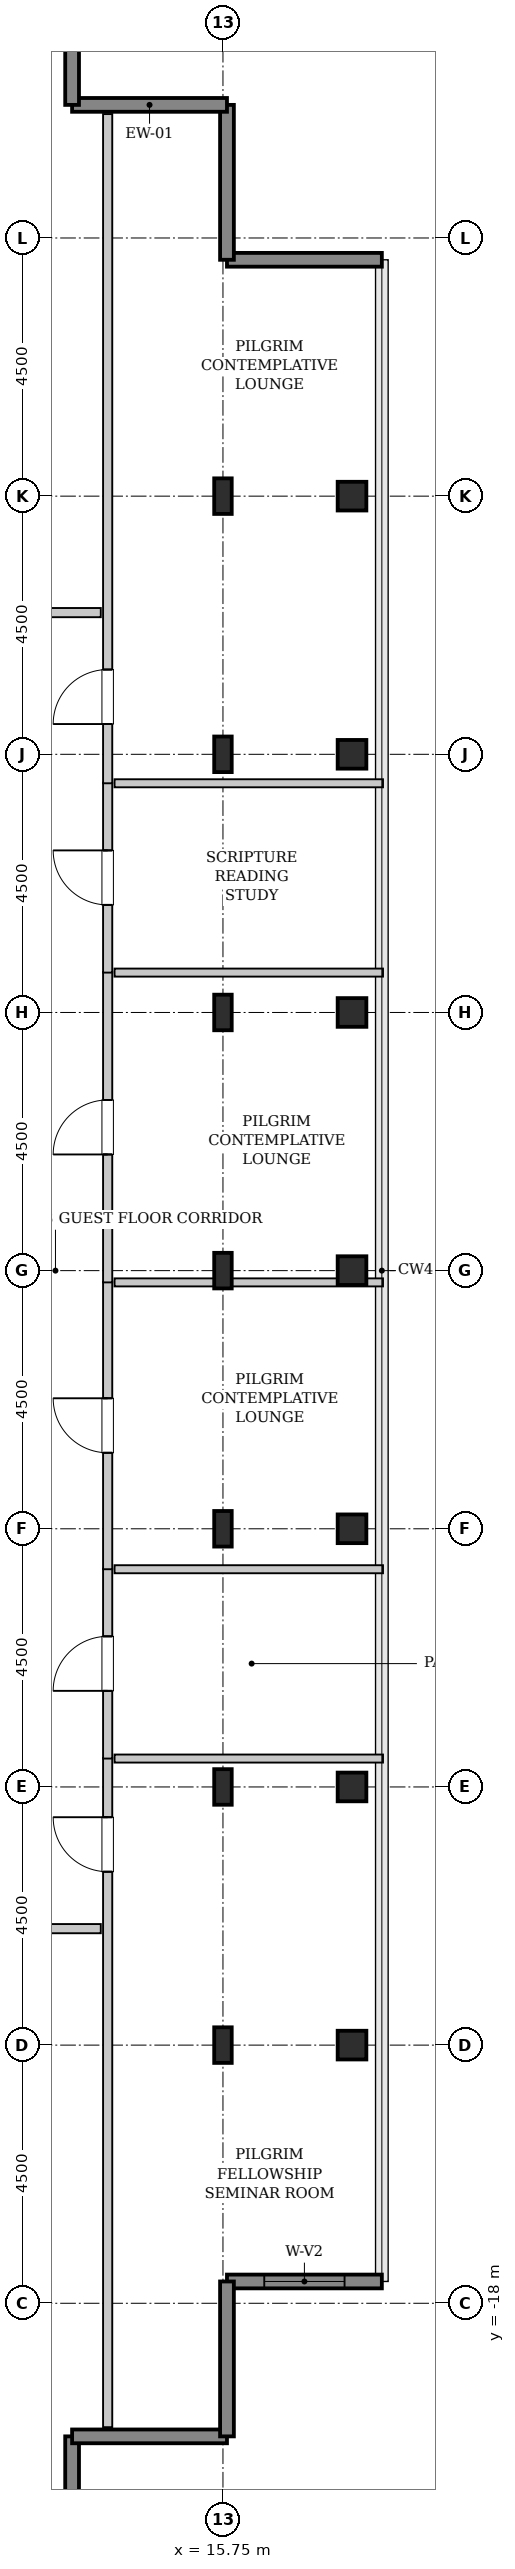
"""IFC4 building model, lengths in metres.
Left out: names, types, materials, properties, quantities, classifications, styles, units other than length and angle.
Written with IfcOpenShell. Run it as: python <this file> out.ifc"""

import sys

from ifc_helpers import new_model, si_unit, direction, frame, frame_2d, origin, origin_2d, place, context, subcontext, project, spatial, rectangle, hollow_rectangle, i_section, extrude, source, transform, mapped, element, fill, save


model = new_model("IFC4")
c1 = context("Model", 3, precision=1e-05, world=origin(), true_north=direction((0.0, 1.0)))
c2 = subcontext(c1, "Body", "Model", "MODEL_VIEW")
j1 = project(units=[si_unit("LENGTHUNIT", "METRE"), si_unit("PLANEANGLEUNIT", "RADIAN")], contexts=[c1])
p1 = place(None, origin())
s1 = spatial("IfcSite", under=j1, at=p1, CompositionType="ELEMENT")
p2 = place(p1, origin())
s2 = spatial("IfcBuilding", under=s1, at=p2, CompositionType="ELEMENT")
p3 = place(p2, frame((0.0, 0.0, 291.2)))
s3 = spatial("IfcBuildingStorey", under=s2, at=p3, CompositionType="ELEMENT", Elevation=291.2)
m1 = source(origin(), c2, "Body", "SweptSolid", [
    extrude(i_section(OverallWidth=0.305, OverallDepth=0.62, WebThickness=0.021, FlangeThickness=0.04, FilletRadius=0.027, at=origin_2d()), origin(), (0.0, 0.0, 1.0), 3.8),
])
for number, where, z_axis, x_axis in (
    (1, (15.75, -13.5, 0.0), (0.0, 0.0, 1.0), (1.0, 0.0, 0.0)),
    (2, (15.75, -9.0, 0.0), (0.0, 0.0, 1.0), (1.0, 0.0, 0.0)),
    (3, (15.75, -4.5, 0.0), (0.0, 0.0, 1.0), (1.0, 0.0, 0.0)),
    (4, (15.75, 0.0, 0.0), (0.0, 0.0, 1.0), (1.0, 0.0, 0.0)),
    (5, (15.75, 4.5, 0.0), (0.0, 0.0, 1.0), (1.0, 0.0, 0.0)),
    (6, (15.75, 9.0, 0.0), (0.0, 0.0, 1.0), (1.0, 0.0, 0.0)),
    (7, (15.75, 13.5, 0.0), (0.0, 0.0, 1.0), (1.0, 0.0, 0.0)),
):
    element("IfcColumn", number, at=place(p3, frame(where, z_axis=z_axis, x_axis=x_axis)), inside=s3, PredefinedType="COLUMN", context=c2, shape_type="MappedRepresentation", body=[
        mapped(m1, transform((0.0, 0.0, 0.0), x_axis=(1.0, 0.0, 0.0), y_axis=(0.0, 1.0, 0.0), z_axis=(0.0, 0.0, 1.0), scale=1.0)),
    ])
m2 = source(origin(), c2, "Body", "SweptSolid", [
    extrude(hollow_rectangle(XDim=0.5, YDim=0.5, WallThickness=0.025, InnerFilletRadius=0.025, OuterFilletRadius=0.05, at=origin_2d()), origin(), (0.0, 0.0, 1.0), 3.8),
])
for number, where, z_axis, x_axis in (
    (8, (18.0, -13.5, 0.0), (0.0, 0.0, 1.0), (1.0, 0.0, 0.0)),
    (9, (18.0, -9.0, 0.0), (0.0, 0.0, 1.0), (1.0, 0.0, 0.0)),
    (10, (18.0, -4.5, 0.0), (0.0, 0.0, 1.0), (1.0, 0.0, 0.0)),
    (11, (18.0, 0.0, 0.0), (0.0, 0.0, 1.0), (1.0, 0.0, 0.0)),
    (12, (18.0, 4.5, 0.0), (0.0, 0.0, 1.0), (1.0, 0.0, 0.0)),
    (13, (18.0, 9.0, 0.0), (0.0, 0.0, 1.0), (1.0, 0.0, 0.0)),
    (14, (18.0, 13.5, 0.0), (0.0, 0.0, 1.0), (1.0, 0.0, 0.0)),
):
    element("IfcColumn", number, at=place(p3, frame(where, z_axis=z_axis, x_axis=x_axis)), inside=s3, PredefinedType="COLUMN", context=c2, shape_type="MappedRepresentation", body=[
        mapped(m2, transform((0.0, 0.0, 0.0), x_axis=(1.0, 0.0, 0.0), y_axis=(0.0, 1.0, 0.0), z_axis=(0.0, 0.0, 1.0), scale=1.0)),
    ])
m3 = source(origin(), c2, "Body", "SweptSolid", [
    extrude(rectangle(XDim=2.7, YDim=0.24, at=frame_2d((1.35, 0.0))), origin(), (0.0, 0.0, 1.0), 3.55),
])
p4 = place(p3, frame((15.82, -17.62, 0.0), z_axis=(0.0, 0.0, 1.0), x_axis=(1.0, 0.0, 0.0)))
e15 = element("IfcWall", 15, at=p4, inside=s3, PredefinedType="SHEAR", context=c2, shape_type="MappedRepresentation", body=[
    mapped(m3, transform((0.0, 0.0, 0.0), x_axis=(1.0, 0.0, 0.0), y_axis=(0.0, 1.0, 0.0), z_axis=(0.0, 0.0, 1.0), scale=1.0)),
])
p5 = place(p4, frame((0.65, 0.0, 0.85)))
e16 = element("IfcOpeningElement", 16, at=p5, cuts=e15, PredefinedType="OPENING", context=c2, shape_type="SweptSolid", body=[
    extrude(rectangle(XDim=1.4, YDim=1.8, at=frame_2d((0.7, 0.9))), frame((0.0, 0.13, 0.0), z_axis=(0.0, -1.0, 0.0), x_axis=(1.0, 0.0, 0.0)), (0.0, 0.0, 1.0), 0.26),
])
for number, where, z_axis, x_axis in (
    (17, (18.52, 17.62, 0.0), (0.0, 0.0, 1.0), (-1.0, 0.0, 0.0)),
    (18, (15.82, 17.62, 0.0), (0.0, 0.0, 1.0), (0.0, 1.0, 0.0)),
    (19, (15.82, 20.32, 0.0), (0.0, 0.0, 1.0), (-1.0, 0.0, 0.0)),
    (20, (13.12, 20.32, 0.0), (0.0, 0.0, 1.0), (0.0, 1.0, 0.0)),
    (21, (13.12, -23.02, 0.0), (0.0, 0.0, 1.0), (0.0, 1.0, 0.0)),
    (22, (13.12, -20.32, 0.0), (0.0, 0.0, 1.0), (1.0, 0.0, 0.0)),
    (23, (15.82, -20.32, 0.0), (0.0, 0.0, 1.0), (0.0, 1.0, 0.0)),
):
    element("IfcWall", number, at=place(p3, frame(where, z_axis=z_axis, x_axis=x_axis)), inside=s3, PredefinedType="SHEAR", context=c2, shape_type="MappedRepresentation", body=[
        mapped(m3, transform((0.0, 0.0, 0.0), x_axis=(1.0, 0.0, 0.0), y_axis=(0.0, 1.0, 0.0), z_axis=(0.0, 0.0, 1.0), scale=1.0)),
    ])
m4 = source(origin(), c2, "Body", "SweptSolid", [
    extrude(rectangle(XDim=11.665, YDim=0.16, at=frame_2d((5.833, 0.0))), origin(), (0.0, 0.0, 1.0), 3.535),
])
p6 = place(p3, frame((13.74, -20.16, 0.0), z_axis=(0.0, 0.0, 1.0), x_axis=(0.0, 1.0, 0.0)))
e24 = element("IfcWall", 24, at=p6, inside=s3, PredefinedType="PARTITIONING", context=c2, shape_type="MappedRepresentation", body=[
    mapped(m4, transform((0.0, 0.0, 0.0), x_axis=(1.0, 0.0, 0.0), y_axis=(0.0, 1.0, 0.0), z_axis=(0.0, 0.0, 1.0), scale=1.0)),
])
p7 = place(p6, frame((9.683, 0.0, 0.0)))
e25 = element("IfcOpeningElement", 25, at=p7, cuts=e24, PredefinedType="OPENING", context=c2, shape_type="SweptSolid", body=[
    extrude(rectangle(XDim=0.95, YDim=2.1, at=frame_2d((0.475, 1.05))), frame((0.0, 0.09, 0.0), z_axis=(0.0, -1.0, 0.0), x_axis=(1.0, 0.0, 0.0)), (0.0, 0.0, 1.0), 0.18),
])
m5 = source(origin(), c2, "Body", "SweptSolid", [
    extrude(rectangle(XDim=4.68, YDim=0.14, at=frame_2d((2.34, 0.0))), origin(), (0.0, 0.0, 1.0), 2.925),
])
p8 = place(p3, frame((13.86, -8.505, 0.0), z_axis=(0.0, 0.0, 1.0), x_axis=(1.0, 0.0, 0.0)))
e26 = element("IfcWall", 26, at=p8, inside=s3, PredefinedType="PARTITIONING", context=c2, shape_type="MappedRepresentation", body=[
    mapped(m5, transform((0.0, 0.0, 0.0), x_axis=(1.0, 0.0, 0.0), y_axis=(0.0, 1.0, 0.0), z_axis=(0.0, 0.0, 1.0), scale=1.0)),
])
m6 = source(origin(), c2, "Body", "SweptSolid", [
    extrude(rectangle(XDim=3.31, YDim=0.16, at=frame_2d((1.655, 0.0))), origin(), (0.0, 0.0, 1.0), 3.535),
])
p9 = place(p3, frame((13.74, -8.505, 0.0), z_axis=(0.0, 0.0, 1.0), x_axis=(0.0, 1.0, 0.0)))
e27 = element("IfcWall", 27, at=p9, inside=s3, PredefinedType="PARTITIONING", context=c2, shape_type="MappedRepresentation", body=[
    mapped(m6, transform((0.0, 0.0, 0.0), x_axis=(1.0, 0.0, 0.0), y_axis=(0.0, 1.0, 0.0), z_axis=(0.0, 0.0, 1.0), scale=1.0)),
])
p10 = place(p9, frame((1.18, 0.0, 0.0)))
e28 = element("IfcOpeningElement", 28, at=p10, cuts=e27, PredefinedType="OPENING", context=c2, shape_type="SweptSolid", body=[
    extrude(rectangle(XDim=0.95, YDim=2.1, at=frame_2d((0.475, 1.05))), frame((0.0, 0.09, 0.0), z_axis=(0.0, -1.0, 0.0), x_axis=(1.0, 0.0, 0.0)), (0.0, 0.0, 1.0), 0.18),
])
m7 = source(origin(), c2, "Body", "SweptSolid", [
    extrude(rectangle(XDim=4.68, YDim=0.14, at=frame_2d((2.34, 0.0))), origin(), (0.0, 0.0, 1.0), 3.535),
])
p11 = place(p3, frame((13.86, -5.205, 0.0), z_axis=(0.0, 0.0, 1.0), x_axis=(1.0, 0.0, 0.0)))
e29 = element("IfcWall", 29, at=p11, inside=s3, PredefinedType="PARTITIONING", context=c2, shape_type="MappedRepresentation", body=[
    mapped(m7, transform((0.0, 0.0, 0.0), x_axis=(1.0, 0.0, 0.0), y_axis=(0.0, 1.0, 0.0), z_axis=(0.0, 0.0, 1.0), scale=1.0)),
])
m8 = source(origin(), c2, "Body", "SweptSolid", [
    extrude(rectangle(XDim=5.01, YDim=0.16, at=frame_2d((2.505, 0.0))), origin(), (0.0, 0.0, 1.0), 3.535),
])
p12 = place(p3, frame((13.74, -5.205, 0.0), z_axis=(0.0, 0.0, 1.0), x_axis=(0.0, 1.0, 0.0)))
e30 = element("IfcWall", 30, at=p12, inside=s3, PredefinedType="PARTITIONING", context=c2, shape_type="MappedRepresentation", body=[
    mapped(m8, transform((0.0, 0.0, 0.0), x_axis=(1.0, 0.0, 0.0), y_axis=(0.0, 1.0, 0.0), z_axis=(0.0, 0.0, 1.0), scale=1.0)),
])
p13 = place(p12, frame((2.03, 0.0, 0.0)))
e31 = element("IfcOpeningElement", 31, at=p13, cuts=e30, PredefinedType="OPENING", context=c2, shape_type="SweptSolid", body=[
    extrude(rectangle(XDim=0.95, YDim=2.1, at=frame_2d((0.475, 1.05))), frame((0.0, 0.09, 0.0), z_axis=(0.0, -1.0, 0.0), x_axis=(1.0, 0.0, 0.0)), (0.0, 0.0, 1.0), 0.18),
])
p14 = place(p3, frame((13.86, -0.205, 0.0), z_axis=(0.0, 0.0, 1.0), x_axis=(1.0, 0.0, 0.0)))
e32 = element("IfcWall", 32, at=p14, inside=s3, PredefinedType="PARTITIONING", context=c2, shape_type="MappedRepresentation", body=[
    mapped(m5, transform((0.0, 0.0, 0.0), x_axis=(1.0, 0.0, 0.0), y_axis=(0.0, 1.0, 0.0), z_axis=(0.0, 0.0, 1.0), scale=1.0)),
])
m9 = source(origin(), c2, "Body", "SweptSolid", [
    extrude(rectangle(XDim=5.41, YDim=0.16, at=frame_2d((2.705, 0.0))), origin(), (0.0, 0.0, 1.0), 3.535),
])
p15 = place(p3, frame((13.74, -0.205, 0.0), z_axis=(0.0, 0.0, 1.0), x_axis=(0.0, 1.0, 0.0)))
e33 = element("IfcWall", 33, at=p15, inside=s3, PredefinedType="PARTITIONING", context=c2, shape_type="MappedRepresentation", body=[
    mapped(m9, transform((0.0, 0.0, 0.0), x_axis=(1.0, 0.0, 0.0), y_axis=(0.0, 1.0, 0.0), z_axis=(0.0, 0.0, 1.0), scale=1.0)),
])
p16 = place(p15, frame((2.23, 0.0, 0.0)))
e34 = element("IfcOpeningElement", 34, at=p16, cuts=e33, PredefinedType="OPENING", context=c2, shape_type="SweptSolid", body=[
    extrude(rectangle(XDim=0.95, YDim=2.1, at=frame_2d((0.475, 1.05))), frame((0.0, 0.09, 0.0), z_axis=(0.0, -1.0, 0.0), x_axis=(1.0, 0.0, 0.0)), (0.0, 0.0, 1.0), 0.18),
])
p17 = place(p3, frame((13.86, 5.195, 0.0), z_axis=(0.0, 0.0, 1.0), x_axis=(1.0, 0.0, 0.0)))
e35 = element("IfcWall", 35, at=p17, inside=s3, PredefinedType="PARTITIONING", context=c2, shape_type="MappedRepresentation", body=[
    mapped(m7, transform((0.0, 0.0, 0.0), x_axis=(1.0, 0.0, 0.0), y_axis=(0.0, 1.0, 0.0), z_axis=(0.0, 0.0, 1.0), scale=1.0)),
])
p18 = place(p3, frame((13.74, 5.195, 0.0), z_axis=(0.0, 0.0, 1.0), x_axis=(0.0, 1.0, 0.0)))
e36 = element("IfcWall", 36, at=p18, inside=s3, PredefinedType="PARTITIONING", context=c2, shape_type="MappedRepresentation", body=[
    mapped(m6, transform((0.0, 0.0, 0.0), x_axis=(1.0, 0.0, 0.0), y_axis=(0.0, 1.0, 0.0), z_axis=(0.0, 0.0, 1.0), scale=1.0)),
])
p19 = place(p18, frame((1.18, 0.0, 0.0)))
e37 = element("IfcOpeningElement", 37, at=p19, cuts=e36, PredefinedType="OPENING", context=c2, shape_type="SweptSolid", body=[
    extrude(rectangle(XDim=0.95, YDim=2.1, at=frame_2d((0.475, 1.05))), frame((0.0, 0.09, 0.0), z_axis=(0.0, -1.0, 0.0), x_axis=(1.0, 0.0, 0.0)), (0.0, 0.0, 1.0), 0.18),
])
p20 = place(p3, frame((13.86, 8.495, 0.0), z_axis=(0.0, 0.0, 1.0), x_axis=(1.0, 0.0, 0.0)))
e38 = element("IfcWall", 38, at=p20, inside=s3, PredefinedType="PARTITIONING", context=c2, shape_type="MappedRepresentation", body=[
    mapped(m5, transform((0.0, 0.0, 0.0), x_axis=(1.0, 0.0, 0.0), y_axis=(0.0, 1.0, 0.0), z_axis=(0.0, 0.0, 1.0), scale=1.0)),
])
p21 = place(p3, frame((13.74, 8.495, 0.0), z_axis=(0.0, 0.0, 1.0), x_axis=(0.0, 1.0, 0.0)))
e39 = element("IfcWall", 39, at=p21, inside=s3, PredefinedType="PARTITIONING", context=c2, shape_type="MappedRepresentation", body=[
    mapped(m4, transform((0.0, 0.0, 0.0), x_axis=(1.0, 0.0, 0.0), y_axis=(0.0, 1.0, 0.0), z_axis=(0.0, 0.0, 1.0), scale=1.0)),
])
p22 = place(p21, frame((1.032, 0.0, 0.0)))
e40 = element("IfcOpeningElement", 40, at=p22, cuts=e39, PredefinedType="OPENING", context=c2, shape_type="SweptSolid", body=[
    extrude(rectangle(XDim=0.95, YDim=2.1, at=frame_2d((0.475, 1.05))), frame((0.0, 0.09, 0.0), z_axis=(0.0, -1.0, 0.0), x_axis=(1.0, 0.0, 0.0)), (0.0, 0.0, 1.0), 0.18),
])
m10 = source(origin(), c2, "Body", "SweptSolid", [
    extrude(rectangle(XDim=5.825, YDim=0.16, at=frame_2d((2.913, 0.0))), origin(), (0.0, 0.0, 1.0), 3.535),
])
p23 = place(p3, frame((7.795, 11.47, 0.0), z_axis=(0.0, 0.0, 1.0), x_axis=(1.0, 0.0, 0.0)))
e41 = element("IfcWall", 41, at=p23, inside=s3, PredefinedType="PARTITIONING", context=c2, shape_type="MappedRepresentation", body=[
    mapped(m10, transform((0.0, 0.0, 0.0), x_axis=(1.0, 0.0, 0.0), y_axis=(0.0, 1.0, 0.0), z_axis=(0.0, 0.0, 1.0), scale=1.0)),
])
p24 = place(p23, frame((2.438, 0.0, 0.0)))
e42 = element("IfcOpeningElement", 42, at=p24, cuts=e41, PredefinedType="OPENING", context=c2, shape_type="SweptSolid", body=[
    extrude(rectangle(XDim=0.95, YDim=2.1, at=frame_2d((0.475, 1.05))), frame((0.0, 0.09, 0.0), z_axis=(0.0, -1.0, 0.0), x_axis=(1.0, 0.0, 0.0)), (0.0, 0.0, 1.0), 0.18),
])
p25 = place(p3, frame((7.795, -11.47, 0.0), z_axis=(0.0, 0.0, 1.0), x_axis=(1.0, 0.0, 0.0)))
e43 = element("IfcWall", 43, at=p25, inside=s3, PredefinedType="PARTITIONING", context=c2, shape_type="MappedRepresentation", body=[
    mapped(m10, transform((0.0, 0.0, 0.0), x_axis=(1.0, 0.0, 0.0), y_axis=(0.0, 1.0, 0.0), z_axis=(0.0, 0.0, 1.0), scale=1.0)),
])
p26 = place(p25, frame((2.438, 0.0, 0.0)))
e44 = element("IfcOpeningElement", 44, at=p26, cuts=e43, PredefinedType="OPENING", context=c2, shape_type="SweptSolid", body=[
    extrude(rectangle(XDim=0.95, YDim=2.1, at=frame_2d((0.475, 1.05))), frame((0.0, 0.09, 0.0), z_axis=(0.0, -1.0, 0.0), x_axis=(1.0, 0.0, 0.0)), (0.0, 0.0, 1.0), 0.18),
])
m11 = source(origin(), c2, "Body", "SweptSolid", [
    extrude(rectangle(XDim=1.4, YDim=1.8, at=frame_2d((0.7, 0.9))), frame((0.0, 0.03, 0.0), z_axis=(0.0, -1.0, 0.0), x_axis=(1.0, 0.0, 0.0)), (0.0, 0.0, 1.0), 0.06),
])
p27 = place(p5, origin())
e45 = element("IfcWindow", 45, at=p27, inside=s3, PartitioningType="SINGLE_PANEL", PredefinedType="WINDOW", context=c2, shape_type="MappedRepresentation", body=[
    mapped(m11, transform((0.0, 0.0, 0.0), x_axis=(1.0, 0.0, 0.0), y_axis=(0.0, 1.0, 0.0), z_axis=(0.0, 0.0, 1.0), scale=1.0)),
])
fill(e16, e45)
m12 = source(origin(), c2, "Body", "SweptSolid", [
    extrude(rectangle(XDim=0.95, YDim=2.1, at=frame_2d((0.475, 1.05))), frame((0.0, 0.025, 0.0), z_axis=(0.0, -1.0, 0.0), x_axis=(1.0, 0.0, 0.0)), (0.0, 0.0, 1.0), 0.05),
])
p28 = place(p7, origin())
e46 = element("IfcDoor", 46, at=p28, inside=s3, OperationType="SINGLE_SWING_RIGHT", PredefinedType="DOOR", context=c2, shape_type="MappedRepresentation", body=[
    mapped(m12, transform((0.0, 0.0, 0.0), x_axis=(1.0, 0.0, 0.0), y_axis=(0.0, 1.0, 0.0), z_axis=(0.0, 0.0, 1.0), scale=1.0)),
])
fill(e25, e46)
p29 = place(p10, origin())
e47 = element("IfcDoor", 47, at=p29, inside=s3, OperationType="SINGLE_SWING_LEFT", PredefinedType="DOOR", context=c2, shape_type="MappedRepresentation", body=[
    mapped(m12, transform((0.0, 0.0, 0.0), x_axis=(1.0, 0.0, 0.0), y_axis=(0.0, 1.0, 0.0), z_axis=(0.0, 0.0, 1.0), scale=1.0)),
])
fill(e28, e47)
p30 = place(p13, origin())
e48 = element("IfcDoor", 48, at=p30, inside=s3, OperationType="SINGLE_SWING_RIGHT", PredefinedType="DOOR", context=c2, shape_type="MappedRepresentation", body=[
    mapped(m12, transform((0.0, 0.0, 0.0), x_axis=(1.0, 0.0, 0.0), y_axis=(0.0, 1.0, 0.0), z_axis=(0.0, 0.0, 1.0), scale=1.0)),
])
fill(e31, e48)
p31 = place(p16, origin())
e49 = element("IfcDoor", 49, at=p31, inside=s3, OperationType="SINGLE_SWING_LEFT", PredefinedType="DOOR", context=c2, shape_type="MappedRepresentation", body=[
    mapped(m12, transform((0.0, 0.0, 0.0), x_axis=(1.0, 0.0, 0.0), y_axis=(0.0, 1.0, 0.0), z_axis=(0.0, 0.0, 1.0), scale=1.0)),
])
fill(e34, e49)
p32 = place(p19, origin())
e50 = element("IfcDoor", 50, at=p32, inside=s3, OperationType="SINGLE_SWING_RIGHT", PredefinedType="DOOR", context=c2, shape_type="MappedRepresentation", body=[
    mapped(m12, transform((0.0, 0.0, 0.0), x_axis=(1.0, 0.0, 0.0), y_axis=(0.0, 1.0, 0.0), z_axis=(0.0, 0.0, 1.0), scale=1.0)),
])
fill(e37, e50)
p33 = place(p22, origin())
e51 = element("IfcDoor", 51, at=p33, inside=s3, OperationType="SINGLE_SWING_LEFT", PredefinedType="DOOR", context=c2, shape_type="MappedRepresentation", body=[
    mapped(m12, transform((0.0, 0.0, 0.0), x_axis=(1.0, 0.0, 0.0), y_axis=(0.0, 1.0, 0.0), z_axis=(0.0, 0.0, 1.0), scale=1.0)),
])
fill(e40, e51)
save(model, sys.argv[1])
